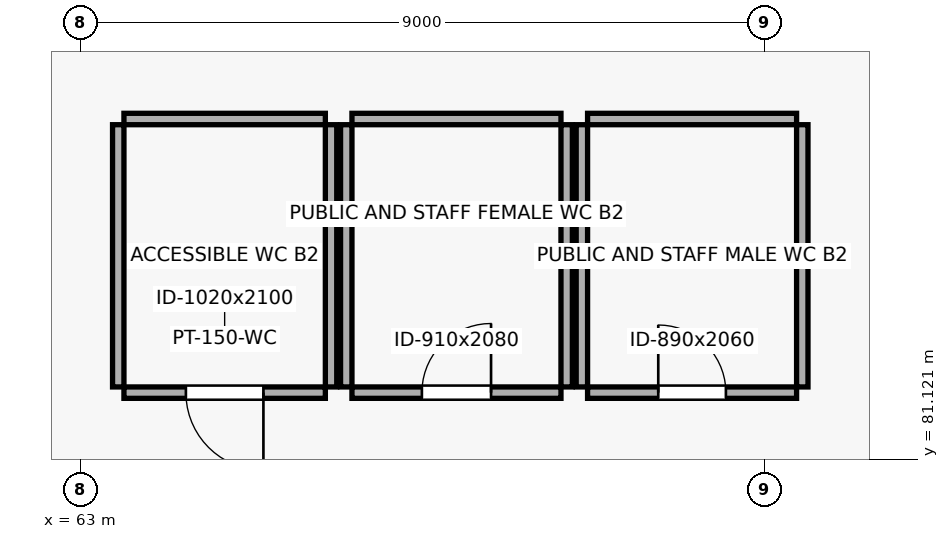
"""IFC4 building model, lengths in metres.
Left out: names, types, materials, properties, quantities, classifications, styles, units other than length and angle.
Written with IfcOpenShell. Run it as: python <this file> out.ifc"""

import sys

from ifc_helpers import new_model, si_unit, direction, frame, frame_2d, origin, place, context, subcontext, project, spatial, rectangle, extrude, element, fill, save


model = new_model("IFC4")
c1 = context("Model", 3, precision=1e-05, world=origin(), true_north=direction((0.0, 1.0)))
c2 = subcontext(c1, "Body", "Model", "MODEL_VIEW")
j1 = project(units=[si_unit("LENGTHUNIT", "METRE"), si_unit("PLANEANGLEUNIT", "RADIAN")], contexts=[c1])
p1 = place(None, origin())
s1 = spatial("IfcSite", under=j1, at=p1, CompositionType="ELEMENT")
p2 = place(p1, origin())
s2 = spatial("IfcBuilding", under=s1, at=p2, CompositionType="ELEMENT")
p3 = place(p2, frame((0.0, 0.0, -9.0)))
s3 = spatial("IfcBuildingStorey", under=s2, at=p3, CompositionType="ELEMENT", Elevation=-9.0)
p4 = place(p3, frame((63.575, 82.0, 0.0), z_axis=(0.0, 0.0, 1.0), x_axis=(1.0, 0.0, 0.0)))
e1 = element("IfcWall", 1, at=p4, inside=s3, PredefinedType="PARTITIONING", context=c2, shape_type="SweptSolid", body=[
    extrude(rectangle(XDim=2.65, YDim=0.15, at=frame_2d((1.325, 0.0))), origin(), (0.0, 0.0, 1.0), 4.2),
])
p5 = place(p4, frame((0.815, 0.0, 0.0)))
e2 = element("IfcOpeningElement", 2, at=p5, cuts=e1, PredefinedType="OPENING", context=c2, shape_type="SweptSolid", body=[
    extrude(rectangle(XDim=1.02, YDim=2.1, at=frame_2d((0.51, 1.05))), frame((0.0, 0.087, 0.0), z_axis=(0.0, -1.0, 0.0), x_axis=(1.0, 0.0, 0.0)), (0.0, 0.0, 1.0), 0.174),
])
p6 = place(p3, frame((63.575, 85.6, 0.0), z_axis=(0.0, 0.0, 1.0), x_axis=(1.0, 0.0, 0.0)))
e3 = element("IfcWall", 3, at=p6, inside=s3, PredefinedType="PARTITIONING", context=c2, shape_type="SweptSolid", body=[
    extrude(rectangle(XDim=2.65, YDim=0.15, at=frame_2d((1.325, 0.0))), origin(), (0.0, 0.0, 1.0), 4.2),
])
for number, where, z_axis, x_axis in (
    (4, (63.5, 82.075, 0.0), (0.0, 0.0, 1.0), (0.0, 1.0, 0.0)),
    (5, (66.3, 82.075, 0.0), (0.0, 0.0, 1.0), (0.0, 1.0, 0.0)),
):
    element("IfcWall", number, at=place(p3, frame(where, z_axis=z_axis, x_axis=x_axis)), inside=s3, PredefinedType="PARTITIONING", context=c2, shape_type="SweptSolid", body=[
        extrude(rectangle(XDim=3.45, YDim=0.15, at=frame_2d((1.725, 0.0))), origin(), (0.0, 0.0, 1.0), 4.2),
    ])
p7 = place(p3, frame((66.575, 82.0, 0.0), z_axis=(0.0, 0.0, 1.0), x_axis=(1.0, 0.0, 0.0)))
e6 = element("IfcWall", 6, at=p7, inside=s3, PredefinedType="PARTITIONING", context=c2, shape_type="SweptSolid", body=[
    extrude(rectangle(XDim=2.75, YDim=0.15, at=frame_2d((1.375, 0.0))), origin(), (0.0, 0.0, 1.0), 4.2),
])
p8 = place(p7, frame((0.92, 0.0, 0.0)))
e7 = element("IfcOpeningElement", 7, at=p8, cuts=e6, PredefinedType="OPENING", context=c2, shape_type="SweptSolid", body=[
    extrude(rectangle(XDim=0.91, YDim=2.08, at=frame_2d((0.455, 1.04))), frame((0.0, 0.087, 0.0), z_axis=(0.0, -1.0, 0.0), x_axis=(1.0, 0.0, 0.0)), (0.0, 0.0, 1.0), 0.174),
])
p9 = place(p3, frame((66.575, 85.6, 0.0), z_axis=(0.0, 0.0, 1.0), x_axis=(1.0, 0.0, 0.0)))
e8 = element("IfcWall", 8, at=p9, inside=s3, PredefinedType="PARTITIONING", context=c2, shape_type="SweptSolid", body=[
    extrude(rectangle(XDim=2.75, YDim=0.15, at=frame_2d((1.375, 0.0))), origin(), (0.0, 0.0, 1.0), 4.2),
])
for number, where, z_axis, x_axis in (
    (9, (66.5, 82.075, 0.0), (0.0, 0.0, 1.0), (0.0, 1.0, 0.0)),
    (10, (69.4, 82.075, 0.0), (0.0, 0.0, 1.0), (0.0, 1.0, 0.0)),
):
    element("IfcWall", number, at=place(p3, frame(where, z_axis=z_axis, x_axis=x_axis)), inside=s3, PredefinedType="PARTITIONING", context=c2, shape_type="SweptSolid", body=[
        extrude(rectangle(XDim=3.45, YDim=0.15, at=frame_2d((1.725, 0.0))), origin(), (0.0, 0.0, 1.0), 4.2),
    ])
p10 = place(p3, frame((69.675, 82.0, 0.0), z_axis=(0.0, 0.0, 1.0), x_axis=(1.0, 0.0, 0.0)))
e11 = element("IfcWall", 11, at=p10, inside=s3, PredefinedType="PARTITIONING", context=c2, shape_type="SweptSolid", body=[
    extrude(rectangle(XDim=2.75, YDim=0.15, at=frame_2d((1.375, 0.0))), origin(), (0.0, 0.0, 1.0), 4.2),
])
p11 = place(p10, frame((0.93, 0.0, 0.0)))
e12 = element("IfcOpeningElement", 12, at=p11, cuts=e11, PredefinedType="OPENING", context=c2, shape_type="SweptSolid", body=[
    extrude(rectangle(XDim=0.89, YDim=2.06, at=frame_2d((0.445, 1.03))), frame((0.0, 0.087, 0.0), z_axis=(0.0, -1.0, 0.0), x_axis=(1.0, 0.0, 0.0)), (0.0, 0.0, 1.0), 0.174),
])
p12 = place(p3, frame((69.675, 85.6, 0.0), z_axis=(0.0, 0.0, 1.0), x_axis=(1.0, 0.0, 0.0)))
e13 = element("IfcWall", 13, at=p12, inside=s3, PredefinedType="PARTITIONING", context=c2, shape_type="SweptSolid", body=[
    extrude(rectangle(XDim=2.75, YDim=0.15, at=frame_2d((1.375, 0.0))), origin(), (0.0, 0.0, 1.0), 4.2),
])
for number, where, z_axis, x_axis in (
    (14, (69.6, 82.075, 0.0), (0.0, 0.0, 1.0), (0.0, 1.0, 0.0)),
    (15, (72.5, 82.075, 0.0), (0.0, 0.0, 1.0), (0.0, 1.0, 0.0)),
):
    element("IfcWall", number, at=place(p3, frame(where, z_axis=z_axis, x_axis=x_axis)), inside=s3, PredefinedType="PARTITIONING", context=c2, shape_type="SweptSolid", body=[
        extrude(rectangle(XDim=3.45, YDim=0.15, at=frame_2d((1.725, 0.0))), origin(), (0.0, 0.0, 1.0), 4.2),
    ])
p13 = place(p5, frame((1.02, 0.0, 0.0), z_axis=(0.0, 0.0, 1.0), x_axis=(-1.0, 0.0, 0.0)))
e16 = element("IfcDoor", 16, at=p13, inside=s3, OperationType="SINGLE_SWING_LEFT", PredefinedType="DOOR", context=c2, shape_type="SweptSolid", body=[
    extrude(rectangle(XDim=1.02, YDim=2.1, at=frame_2d((0.51, 1.05))), frame((0.0, 0.025, 0.0), z_axis=(0.0, -1.0, 0.0), x_axis=(1.0, 0.0, 0.0)), (0.0, 0.0, 1.0), 0.05),
])
fill(e2, e16)
p14 = place(p8, origin())
e17 = element("IfcDoor", 17, at=p14, inside=s3, OperationType="SINGLE_SWING_RIGHT", PredefinedType="DOOR", context=c2, shape_type="SweptSolid", body=[
    extrude(rectangle(XDim=0.91, YDim=2.08, at=frame_2d((0.455, 1.04))), frame((0.0, 0.025, 0.0), z_axis=(0.0, -1.0, 0.0), x_axis=(1.0, 0.0, 0.0)), (0.0, 0.0, 1.0), 0.05),
])
fill(e7, e17)
p15 = place(p11, origin())
e18 = element("IfcDoor", 18, at=p15, inside=s3, OperationType="SINGLE_SWING_LEFT", PredefinedType="DOOR", context=c2, shape_type="SweptSolid", body=[
    extrude(rectangle(XDim=0.89, YDim=2.06, at=frame_2d((0.445, 1.03))), frame((0.0, 0.025, 0.0), z_axis=(0.0, -1.0, 0.0), x_axis=(1.0, 0.0, 0.0)), (0.0, 0.0, 1.0), 0.05),
])
fill(e12, e18)
save(model, sys.argv[1])
